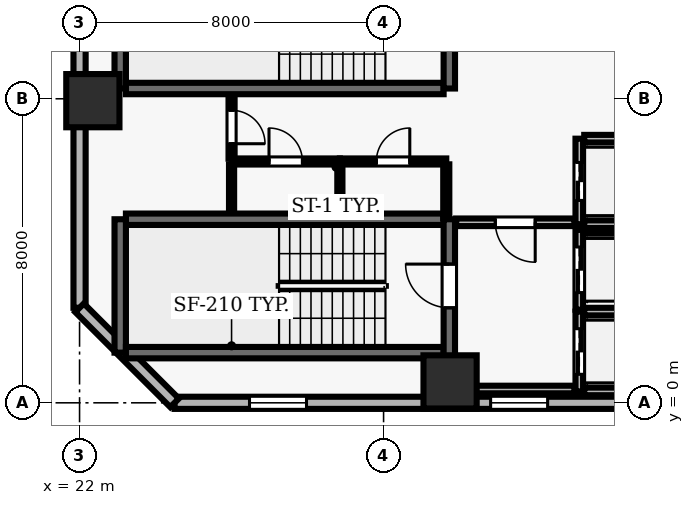
"""IFC4 building model, lengths in metres.
Left out: names, types, materials, properties, quantities, classifications, styles, units other than length and angle.
Written with IfcOpenShell. Run it as: python <this file> out.ifc"""

import sys

from ifc_helpers import new_model, si_unit, direction, frame, frame_2d, origin, origin_2d, place, context, subcontext, project, spatial, rectangle, extrude, element, fill, save


model = new_model("IFC4")
c1 = context("Model", 3, precision=1e-05, world=origin(), true_north=direction((0.0, 1.0)))
c2 = subcontext(c1, "Body", "Model", "MODEL_VIEW")
j1 = project(units=[si_unit("LENGTHUNIT", "METRE"), si_unit("PLANEANGLEUNIT", "RADIAN")], contexts=[c1])
p1 = place(None, origin())
s1 = spatial("IfcSite", under=j1, at=p1, CompositionType="ELEMENT")
p2 = place(p1, origin())
s2 = spatial("IfcBuilding", under=s1, at=p2, CompositionType="ELEMENT")
p3 = place(p2, frame((0.0, 0.0, 58.3)))
s3 = spatial("IfcBuildingStorey", under=s2, at=p3, CompositionType="ELEMENT", Elevation=58.3)
for number, where, z_axis, x_axis in (
    (1, (31.75, 0.55, 0.0), (0.0, 0.0, 1.0), (1.0, 0.0, 0.0)),
    (2, (22.35, 7.95, 0.0), (0.0, 0.0, 1.0), (1.0, 0.0, 0.0)),
):
    element("IfcColumn", number, at=place(p3, frame(where, z_axis=z_axis, x_axis=x_axis)), inside=s3, PredefinedType="COLUMN", context=c2, shape_type="SweptSolid", body=[
        extrude(rectangle(XDim=1.4, YDim=1.4, at=origin_2d()), origin(), (0.0, 0.0, 1.0), 3.9),
    ])
p4 = place(p3, frame((24.5, 0.0, 0.0), z_axis=(0.0, 0.0, 1.0), x_axis=(1.0, 0.0, 0.0)))
e3 = element("IfcWall", 3, at=p4, inside=s3, PredefinedType="SOLIDWALL", context=c2, shape_type="SweptSolid", body=[
    extrude(rectangle(XDim=49.0, YDim=0.32, at=frame_2d((24.5, 0.0))), origin(), (0.0, 0.0, 1.0), 3.69),
])
p5 = place(p4, frame((1.972, 0.0, 0.9)))
e4 = element("IfcOpeningElement", 4, at=p5, cuts=e3, PredefinedType="OPENING", context=c2, shape_type="SweptSolid", body=[
    extrude(rectangle(XDim=1.5, YDim=1.6, at=frame_2d((0.75, 0.8))), frame((0.0, 0.17, 0.0), z_axis=(0.0, -1.0, 0.0), x_axis=(1.0, 0.0, 0.0)), (0.0, 0.0, 1.0), 0.34),
])
p6 = place(p4, frame((8.317, 0.0, 0.9)))
e5 = element("IfcOpeningElement", 5, at=p6, cuts=e3, PredefinedType="OPENING", context=c2, shape_type="SweptSolid", body=[
    extrude(rectangle(XDim=1.5, YDim=1.6, at=frame_2d((0.75, 0.8))), frame((0.0, 0.17, 0.0), z_axis=(0.0, -1.0, 0.0), x_axis=(1.0, 0.0, 0.0)), (0.0, 0.0, 1.0), 0.34),
])
p7 = place(p4, frame((18.306, 0.0, 0.9)))
e6 = element("IfcOpeningElement", 6, at=p7, cuts=e3, PredefinedType="OPENING", context=c2, shape_type="SweptSolid", body=[
    extrude(rectangle(XDim=1.5, YDim=1.6, at=frame_2d((0.75, 0.8))), frame((0.0, 0.17, 0.0), z_axis=(0.0, -1.0, 0.0), x_axis=(1.0, 0.0, 0.0)), (0.0, 0.0, 1.0), 0.34),
])
p8 = place(p4, frame((29.194, 0.0, 0.9)))
e7 = element("IfcOpeningElement", 7, at=p8, cuts=e3, PredefinedType="OPENING", context=c2, shape_type="SweptSolid", body=[
    extrude(rectangle(XDim=1.5, YDim=1.6, at=frame_2d((0.75, 0.8))), frame((0.0, 0.17, 0.0), z_axis=(0.0, -1.0, 0.0), x_axis=(1.0, 0.0, 0.0)), (0.0, 0.0, 1.0), 0.34),
])
p9 = place(p4, frame((35.089, 0.0, 0.9)))
e8 = element("IfcOpeningElement", 8, at=p9, cuts=e3, PredefinedType="OPENING", context=c2, shape_type="SweptSolid", body=[
    extrude(rectangle(XDim=1.5, YDim=1.6, at=frame_2d((0.75, 0.8))), frame((0.0, 0.17, 0.0), z_axis=(0.0, -1.0, 0.0), x_axis=(1.0, 0.0, 0.0)), (0.0, 0.0, 1.0), 0.34),
])
p10 = place(p4, frame((40.083, 0.0, 0.9)))
e9 = element("IfcOpeningElement", 9, at=p10, cuts=e3, PredefinedType="OPENING", context=c2, shape_type="SweptSolid", body=[
    extrude(rectangle(XDim=1.5, YDim=1.6, at=frame_2d((0.75, 0.8))), frame((0.0, 0.17, 0.0), z_axis=(0.0, -1.0, 0.0), x_axis=(1.0, 0.0, 0.0)), (0.0, 0.0, 1.0), 0.34),
])
p11 = place(p4, frame((45.528, 0.0, 0.9)))
e10 = element("IfcOpeningElement", 10, at=p11, cuts=e3, PredefinedType="OPENING", context=c2, shape_type="SweptSolid", body=[
    extrude(rectangle(XDim=1.5, YDim=1.6, at=frame_2d((0.75, 0.8))), frame((0.0, 0.17, 0.0), z_axis=(0.0, -1.0, 0.0), x_axis=(1.0, 0.0, 0.0)), (0.0, 0.0, 1.0), 0.34),
])
p12 = place(p3, frame((22.0, 51.5, 0.0), z_axis=(0.0, 0.0, 1.0), x_axis=(0.0, -1.0, 0.0)))
e11 = element("IfcWall", 11, at=p12, inside=s3, PredefinedType="SOLIDWALL", context=c2, shape_type="SweptSolid", body=[
    extrude(rectangle(XDim=49.0, YDim=0.32, at=frame_2d((24.5, 0.0))), origin(), (0.0, 0.0, 1.0), 3.69),
])
p13 = place(p12, frame((17.8, 0.0, 0.0)))
e12 = element("IfcOpeningElement", 12, at=p13, cuts=e11, PredefinedType="OPENING", context=c2, shape_type="SweptSolid", body=[
    extrude(rectangle(XDim=1.0, YDim=2.2, at=frame_2d((0.5, 1.1))), frame((0.0, 0.17, 0.0), z_axis=(0.0, -1.0, 0.0), x_axis=(1.0, 0.0, 0.0)), (0.0, 0.0, 1.0), 0.34),
])
p14 = place(p12, frame((1.972, 0.0, 0.9)))
e13 = element("IfcOpeningElement", 13, at=p14, cuts=e11, PredefinedType="OPENING", context=c2, shape_type="SweptSolid", body=[
    extrude(rectangle(XDim=1.5, YDim=1.6, at=frame_2d((0.75, 0.8))), frame((0.0, 0.17, 0.0), z_axis=(0.0, -1.0, 0.0), x_axis=(1.0, 0.0, 0.0)), (0.0, 0.0, 1.0), 0.34),
])
p15 = place(p12, frame((7.417, 0.0, 0.9)))
e14 = element("IfcOpeningElement", 14, at=p15, cuts=e11, PredefinedType="OPENING", context=c2, shape_type="SweptSolid", body=[
    extrude(rectangle(XDim=1.5, YDim=1.6, at=frame_2d((0.75, 0.8))), frame((0.0, 0.17, 0.0), z_axis=(0.0, -1.0, 0.0), x_axis=(1.0, 0.0, 0.0)), (0.0, 0.0, 1.0), 0.34),
])
p16 = place(p12, frame((12.861, 0.0, 0.9)))
e15 = element("IfcOpeningElement", 15, at=p16, cuts=e11, PredefinedType="OPENING", context=c2, shape_type="SweptSolid", body=[
    extrude(rectangle(XDim=1.5, YDim=1.6, at=frame_2d((0.75, 0.8))), frame((0.0, 0.17, 0.0), z_axis=(0.0, -1.0, 0.0), x_axis=(1.0, 0.0, 0.0)), (0.0, 0.0, 1.0), 0.34),
])
p17 = place(p12, frame((19.206, 0.0, 0.9)))
e16 = element("IfcOpeningElement", 16, at=p17, cuts=e11, PredefinedType="OPENING", context=c2, shape_type="SweptSolid", body=[
    extrude(rectangle(XDim=1.5, YDim=1.6, at=frame_2d((0.75, 0.8))), frame((0.0, 0.17, 0.0), z_axis=(0.0, -1.0, 0.0), x_axis=(1.0, 0.0, 0.0)), (0.0, 0.0, 1.0), 0.34),
])
p18 = place(p12, frame((23.3, 0.0, 0.9)))
e17 = element("IfcOpeningElement", 17, at=p18, cuts=e11, PredefinedType="OPENING", context=c2, shape_type="SweptSolid", body=[
    extrude(rectangle(XDim=1.5, YDim=1.6, at=frame_2d((0.75, 0.8))), frame((0.0, 0.17, 0.0), z_axis=(0.0, -1.0, 0.0), x_axis=(1.0, 0.0, 0.0)), (0.0, 0.0, 1.0), 0.34),
])
p19 = place(p12, frame((29.194, 0.0, 0.9)))
e18 = element("IfcOpeningElement", 18, at=p19, cuts=e11, PredefinedType="OPENING", context=c2, shape_type="SweptSolid", body=[
    extrude(rectangle(XDim=1.5, YDim=1.6, at=frame_2d((0.75, 0.8))), frame((0.0, 0.17, 0.0), z_axis=(0.0, -1.0, 0.0), x_axis=(1.0, 0.0, 0.0)), (0.0, 0.0, 1.0), 0.34),
])
p20 = place(p12, frame((34.189, 0.0, 0.9)))
e19 = element("IfcOpeningElement", 19, at=p20, cuts=e11, PredefinedType="OPENING", context=c2, shape_type="SweptSolid", body=[
    extrude(rectangle(XDim=1.5, YDim=1.6, at=frame_2d((0.75, 0.8))), frame((0.0, 0.17, 0.0), z_axis=(0.0, -1.0, 0.0), x_axis=(1.0, 0.0, 0.0)), (0.0, 0.0, 1.0), 0.34),
])
p21 = place(p12, frame((40.083, 0.0, 0.9)))
e20 = element("IfcOpeningElement", 20, at=p21, cuts=e11, PredefinedType="OPENING", context=c2, shape_type="SweptSolid", body=[
    extrude(rectangle(XDim=1.5, YDim=1.6, at=frame_2d((0.75, 0.8))), frame((0.0, 0.17, 0.0), z_axis=(0.0, -1.0, 0.0), x_axis=(1.0, 0.0, 0.0)), (0.0, 0.0, 1.0), 0.34),
])
p22 = place(p3, frame((22.0, 2.5, 0.0), z_axis=(0.0, 0.0, 1.0), x_axis=(0.707106781187, -0.707106781187, 0.0)))
e21 = element("IfcWall", 21, at=p22, inside=s3, PredefinedType="SOLIDWALL", context=c2, shape_type="SweptSolid", body=[
    extrude(rectangle(XDim=3.536, YDim=0.32, at=frame_2d((1.768, 0.0))), origin(), (0.0, 0.0, 1.0), 3.69),
])
p23 = place(p3, frame((31.58, 4.83, 0.0), z_axis=(0.0, 0.0, 1.0), x_axis=(-1.0, 0.0, 0.0)))
e22 = element("IfcWall", 22, at=p23, inside=s3, PredefinedType="SHEAR", context=c2, shape_type="SweptSolid", body=[
    extrude(rectangle(XDim=8.36, YDim=0.3, at=frame_2d((4.18, 0.0))), origin(), (0.0, 0.0, 1.0), 3.69),
])
p24 = place(p3, frame((23.07, 4.83, 0.0), z_axis=(0.0, 0.0, 1.0), x_axis=(0.0, -1.0, 0.0)))
e23 = element("IfcWall", 23, at=p24, inside=s3, PredefinedType="SHEAR", context=c2, shape_type="SweptSolid", body=[
    extrude(rectangle(XDim=3.51, YDim=0.3, at=frame_2d((1.755, 0.0))), origin(), (0.0, 0.0, 1.0), 3.69),
])
p25 = place(p3, frame((23.22, 1.32, 0.0), z_axis=(0.0, 0.0, 1.0), x_axis=(1.0, 0.0, 0.0)))
e24 = element("IfcWall", 24, at=p25, inside=s3, PredefinedType="SHEAR", context=c2, shape_type="SweptSolid", body=[
    extrude(rectangle(XDim=8.36, YDim=0.3, at=frame_2d((4.18, 0.0))), origin(), (0.0, 0.0, 1.0), 3.69),
])
p26 = place(p3, frame((31.73, 0.96, 0.0), z_axis=(0.0, 0.0, 1.0), x_axis=(0.0, 1.0, 0.0)))
e25 = element("IfcWall", 25, at=p26, inside=s3, PredefinedType="SHEAR", context=c2, shape_type="SweptSolid", body=[
    extrude(rectangle(XDim=3.87, YDim=0.3, at=frame_2d((1.935, 0.0))), origin(), (0.0, 0.0, 1.0), 3.69),
])
p27 = place(p26, frame((1.54, 0.0, 0.0)))
e26 = element("IfcOpeningElement", 26, at=p27, cuts=e25, PredefinedType="OPENING", context=c2, shape_type="SweptSolid", body=[
    extrude(rectangle(XDim=1.15, YDim=2.15, at=frame_2d((0.575, 1.075))), frame((0.0, 0.16, 0.0), z_axis=(0.0, -1.0, 0.0), x_axis=(1.0, 0.0, 0.0)), (0.0, 0.0, 1.0), 0.32),
])
p28 = place(p3, frame((23.07, 11.78, 0.0), z_axis=(0.0, 0.0, 1.0), x_axis=(0.0, -1.0, 0.0)))
e27 = element("IfcWall", 27, at=p28, inside=s3, PredefinedType="SHEAR", context=c2, shape_type="SweptSolid", body=[
    extrude(rectangle(XDim=3.51, YDim=0.3, at=frame_2d((1.755, 0.0))), origin(), (0.0, 0.0, 1.0), 3.69),
])
p29 = place(p3, frame((23.22, 8.27, 0.0), z_axis=(0.0, 0.0, 1.0), x_axis=(1.0, 0.0, 0.0)))
e28 = element("IfcWall", 28, at=p29, inside=s3, PredefinedType="SHEAR", context=c2, shape_type="SweptSolid", body=[
    extrude(rectangle(XDim=8.36, YDim=0.3, at=frame_2d((4.18, 0.0))), origin(), (0.0, 0.0, 1.0), 3.69),
])
p30 = place(p3, frame((31.73, 8.27, 0.0), z_axis=(0.0, 0.0, 1.0), x_axis=(0.0, 1.0, 0.0)))
e29 = element("IfcWall", 29, at=p30, inside=s3, PredefinedType="SHEAR", context=c2, shape_type="SweptSolid", body=[
    extrude(rectangle(XDim=3.51, YDim=0.3, at=frame_2d((1.755, 0.0))), origin(), (0.0, 0.0, 1.0), 3.69),
])
p31 = place(p30, frame((1.18, 0.0, 0.0)))
e30 = element("IfcOpeningElement", 30, at=p31, cuts=e29, PredefinedType="OPENING", context=c2, shape_type="SweptSolid", body=[
    extrude(rectangle(XDim=1.15, YDim=2.15, at=frame_2d((0.575, 1.075))), frame((0.0, 0.16, 0.0), z_axis=(0.0, -1.0, 0.0), x_axis=(1.0, 0.0, 0.0)), (0.0, 0.0, 1.0), 0.32),
])
p32 = place(p3, frame((35.15, 2.4, 0.0), z_axis=(0.0, 0.0, 1.0), x_axis=(0.0, -1.0, 0.0)))
e31 = element("IfcWall", 31, at=p32, inside=s3, PredefinedType="SOLIDWALL", context=c2, shape_type="SweptSolid", body=[
    extrude(rectangle(XDim=2.1, YDim=0.2, at=frame_2d((1.05, 0.0))), origin(), (0.0, 0.0, 1.0), 3.69),
])
p33 = place(p32, frame((0.45, 0.0, 0.0)))
e32 = element("IfcOpeningElement", 32, at=p33, cuts=e31, PredefinedType="OPENING", context=c2, shape_type="SweptSolid", body=[
    extrude(rectangle(XDim=1.2, YDim=2.15, at=frame_2d((0.6, 1.075))), frame((0.0, 0.11, 0.0), z_axis=(0.0, -1.0, 0.0), x_axis=(1.0, 0.0, 0.0)), (0.0, 0.0, 1.0), 0.22),
])
for number, where, z_axis, x_axis in (
    (33, (35.28, 0.3, 0.0), (0.0, 0.0, 1.0), (1.0, 0.0, 0.0)),
    (34, (37.42, 2.4, 0.0), (0.0, 0.0, 1.0), (-1.0, 0.0, 0.0)),
):
    element("IfcWall", number, at=place(p3, frame(where, z_axis=z_axis, x_axis=x_axis)), inside=s3, PredefinedType="SOLIDWALL", context=c2, shape_type="SweptSolid", body=[
        extrude(rectangle(XDim=2.14, YDim=0.2, at=frame_2d((1.07, 0.0))), origin(), (0.0, 0.0, 1.0), 3.69),
    ])
p34 = place(p3, frame((35.15, 4.55, 0.0), z_axis=(0.0, 0.0, 1.0), x_axis=(0.0, -1.0, 0.0)))
e35 = element("IfcWall", 35, at=p34, inside=s3, PredefinedType="SOLIDWALL", context=c2, shape_type="SweptSolid", body=[
    extrude(rectangle(XDim=2.1, YDim=0.2, at=frame_2d((1.05, 0.0))), origin(), (0.0, 0.0, 1.0), 3.69),
])
p35 = place(p34, frame((0.45, 0.0, 0.0)))
e36 = element("IfcOpeningElement", 36, at=p35, cuts=e35, PredefinedType="OPENING", context=c2, shape_type="SweptSolid", body=[
    extrude(rectangle(XDim=1.2, YDim=2.15, at=frame_2d((0.6, 1.075))), frame((0.0, 0.11, 0.0), z_axis=(0.0, -1.0, 0.0), x_axis=(1.0, 0.0, 0.0)), (0.0, 0.0, 1.0), 0.22),
])
p36 = place(p3, frame((37.42, 4.55, 0.0), z_axis=(0.0, 0.0, 1.0), x_axis=(-1.0, 0.0, 0.0)))
e37 = element("IfcWall", 37, at=p36, inside=s3, PredefinedType="SOLIDWALL", context=c2, shape_type="SweptSolid", body=[
    extrude(rectangle(XDim=2.14, YDim=0.2, at=frame_2d((1.07, 0.0))), origin(), (0.0, 0.0, 1.0), 3.69),
])
p37 = place(p3, frame((35.15, 6.95, 0.0), z_axis=(0.0, 0.0, 1.0), x_axis=(0.0, -1.0, 0.0)))
e38 = element("IfcWall", 38, at=p37, inside=s3, PredefinedType="SOLIDWALL", context=c2, shape_type="SweptSolid", body=[
    extrude(rectangle(XDim=2.25, YDim=0.2, at=frame_2d((1.125, 0.0))), origin(), (0.0, 0.0, 1.0), 3.69),
])
p38 = place(p37, frame((0.625, 0.0, 0.0)))
e39 = element("IfcOpeningElement", 39, at=p38, cuts=e38, PredefinedType="OPENING", context=c2, shape_type="SweptSolid", body=[
    extrude(rectangle(XDim=1.0, YDim=2.1, at=frame_2d((0.5, 1.05))), frame((0.0, 0.11, 0.0), z_axis=(0.0, -1.0, 0.0), x_axis=(1.0, 0.0, 0.0)), (0.0, 0.0, 1.0), 0.22),
])
for number, where, z_axis, x_axis in (
    (40, (35.28, 4.7, 0.0), (0.0, 0.0, 1.0), (1.0, 0.0, 0.0)),
    (41, (37.42, 6.95, 0.0), (0.0, 0.0, 1.0), (-1.0, 0.0, 0.0)),
):
    element("IfcWall", number, at=place(p3, frame(where, z_axis=z_axis, x_axis=x_axis)), inside=s3, PredefinedType="SOLIDWALL", context=c2, shape_type="SweptSolid", body=[
        extrude(rectangle(XDim=2.14, YDim=0.2, at=frame_2d((1.07, 0.0))), origin(), (0.0, 0.0, 1.0), 3.69),
    ])
p39 = place(p3, frame((26.0, 6.35, 0.0), z_axis=(0.0, 0.0, 1.0), x_axis=(1.0, 0.0, 0.0)))
e42 = element("IfcWall", 42, at=p39, inside=s3, PredefinedType="PARTITIONING", context=c2, shape_type="SweptSolid", body=[
    extrude(rectangle(XDim=2.85, YDim=0.16, at=frame_2d((1.425, 0.0))), origin(), (0.0, 0.0, 1.0), 3.69),
])
p40 = place(p39, frame((0.985, 0.0, 0.0)))
e43 = element("IfcOpeningElement", 43, at=p40, cuts=e42, PredefinedType="OPENING", context=c2, shape_type="SweptSolid", body=[
    extrude(rectangle(XDim=0.88, YDim=2.1, at=frame_2d((0.44, 1.05))), frame((0.0, 0.09, 0.0), z_axis=(0.0, -1.0, 0.0), x_axis=(1.0, 0.0, 0.0)), (0.0, 0.0, 1.0), 0.18),
])
p41 = place(p3, frame((28.85, 6.35, 0.0), z_axis=(0.0, 0.0, 1.0), x_axis=(1.0, 0.0, 0.0)))
e44 = element("IfcWall", 44, at=p41, inside=s3, PredefinedType="PARTITIONING", context=c2, shape_type="SweptSolid", body=[
    extrude(rectangle(XDim=2.8, YDim=0.16, at=frame_2d((1.4, 0.0))), origin(), (0.0, 0.0, 1.0), 3.69),
])
p42 = place(p41, frame((0.96, 0.0, 0.0)))
e45 = element("IfcOpeningElement", 45, at=p42, cuts=e44, PredefinedType="OPENING", context=c2, shape_type="SweptSolid", body=[
    extrude(rectangle(XDim=0.88, YDim=2.1, at=frame_2d((0.44, 1.05))), frame((0.0, 0.09, 0.0), z_axis=(0.0, -1.0, 0.0), x_axis=(1.0, 0.0, 0.0)), (0.0, 0.0, 1.0), 0.18),
])
p43 = place(p3, frame((31.65, 0.35, 0.0), z_axis=(0.0, 0.0, 1.0), x_axis=(1.0, 0.0, 0.0)))
e46 = element("IfcWall", 46, at=p43, inside=s3, PredefinedType="SOLIDWALL", context=c2, shape_type="SweptSolid", body=[
    extrude(rectangle(XDim=3.37, YDim=0.2, at=frame_2d((1.685, 0.0))), origin(), (0.0, 0.0, 1.0), 3.69),
])
p44 = place(p3, frame((35.02, 4.75, 0.0), z_axis=(0.0, 0.0, 1.0), x_axis=(-1.0, 0.0, 0.0)))
e47 = element("IfcWall", 47, at=p44, inside=s3, PredefinedType="SOLIDWALL", context=c2, shape_type="SweptSolid", body=[
    extrude(rectangle(XDim=3.11, YDim=0.2, at=frame_2d((1.555, 0.0))), origin(), (0.0, 0.0, 1.0), 3.69),
])
p45 = place(p44, frame((1.03, 0.0, 0.0)))
e48 = element("IfcOpeningElement", 48, at=p45, cuts=e47, PredefinedType="OPENING", context=c2, shape_type="SweptSolid", body=[
    extrude(rectangle(XDim=1.05, YDim=2.15, at=frame_2d((0.525, 1.075))), frame((0.0, 0.11, 0.0), z_axis=(0.0, -1.0, 0.0), x_axis=(1.0, 0.0, 0.0)), (0.0, 0.0, 1.0), 0.22),
])
p46 = place(p3, frame((26.0, 5.01, 0.0), z_axis=(0.0, 0.0, 1.0), x_axis=(0.0, 1.0, 0.0)))
e49 = element("IfcWall", 49, at=p46, inside=s3, PredefinedType="PARTITIONING", context=c2, shape_type="SweptSolid", body=[
    extrude(rectangle(XDim=1.265, YDim=0.135, at=frame_2d((0.632, 0.0))), origin(), (0.0, 0.0, 1.0), 3.69),
])
p47 = place(p3, frame((26.0, 8.09, 0.0), z_axis=(0.0, 0.0, 1.0), x_axis=(0.0, -1.0, 0.0)))
e50 = element("IfcWall", 50, at=p47, inside=s3, PredefinedType="PARTITIONING", context=c2, shape_type="SweptSolid", body=[
    extrude(rectangle(XDim=1.665, YDim=0.16, at=frame_2d((0.833, 0.0))), origin(), (0.0, 0.0, 1.0), 3.69),
])
p48 = place(p47, frame((0.393, 0.0, 0.0)))
e51 = element("IfcOpeningElement", 51, at=p48, cuts=e50, PredefinedType="OPENING", context=c2, shape_type="SweptSolid", body=[
    extrude(rectangle(XDim=0.88, YDim=2.1, at=frame_2d((0.44, 1.05))), frame((0.0, 0.09, 0.0), z_axis=(0.0, -1.0, 0.0), x_axis=(1.0, 0.0, 0.0)), (0.0, 0.0, 1.0), 0.18),
])
p49 = place(p3, frame((28.85, 5.01, 0.0), z_axis=(0.0, 0.0, 1.0), x_axis=(0.0, 1.0, 0.0)))
e52 = element("IfcWall", 52, at=p49, inside=s3, PredefinedType="PARTITIONING", context=c2, shape_type="SweptSolid", body=[
    extrude(rectangle(XDim=1.265, YDim=0.135, at=frame_2d((0.632, 0.0))), origin(), (0.0, 0.0, 1.0), 3.69),
])
p50 = place(p3, frame((31.65, 4.86, 0.0), z_axis=(0.0, 0.0, 1.0), x_axis=(0.0, 1.0, 0.0)))
e53 = element("IfcWall", 53, at=p50, inside=s3, PredefinedType="PARTITIONING", context=c2, shape_type="SweptSolid", body=[
    extrude(rectangle(XDim=1.415, YDim=0.16, at=frame_2d((0.708, 0.0))), origin(), (0.0, 0.0, 1.0), 3.69),
])
p51 = place(p5, origin())
e54 = element("IfcWindow", 54, at=p51, inside=s3, PartitioningType="SINGLE_PANEL", PredefinedType="WINDOW", context=c2, shape_type="SweptSolid", body=[
    extrude(rectangle(XDim=1.5, YDim=1.6, at=frame_2d((0.75, 0.8))), frame((0.0, 0.03, 0.0), z_axis=(0.0, -1.0, 0.0), x_axis=(1.0, 0.0, 0.0)), (0.0, 0.0, 1.0), 0.06),
])
fill(e4, e54)
p52 = place(p6, origin())
e55 = element("IfcWindow", 55, at=p52, inside=s3, PartitioningType="SINGLE_PANEL", PredefinedType="WINDOW", context=c2, shape_type="SweptSolid", body=[
    extrude(rectangle(XDim=1.5, YDim=1.6, at=frame_2d((0.75, 0.8))), frame((0.0, 0.03, 0.0), z_axis=(0.0, -1.0, 0.0), x_axis=(1.0, 0.0, 0.0)), (0.0, 0.0, 1.0), 0.06),
])
fill(e5, e55)
p53 = place(p27, origin())
e56 = element("IfcDoor", 56, at=p53, inside=s3, OperationType="SINGLE_SWING_RIGHT", PredefinedType="DOOR", context=c2, shape_type="SweptSolid", body=[
    extrude(rectangle(XDim=1.15, YDim=2.15, at=frame_2d((0.575, 1.075))), frame((0.0, 0.025, 0.0), z_axis=(0.0, -1.0, 0.0), x_axis=(1.0, 0.0, 0.0)), (0.0, 0.0, 1.0), 0.05),
])
fill(e26, e56)
p54 = place(p33, origin())
e57 = element("IfcDoor", 57, at=p54, inside=s3, OperationType="DOUBLE_DOOR_SLIDING", PredefinedType="DOOR", context=c2, shape_type="SweptSolid", body=[
    extrude(rectangle(XDim=1.2, YDim=2.15, at=frame_2d((0.6, 1.075))), frame((0.0, 0.025, 0.0), z_axis=(0.0, -1.0, 0.0), x_axis=(1.0, 0.0, 0.0)), (0.0, 0.0, 1.0), 0.05),
])
fill(e32, e57)
p55 = place(p35, origin())
e58 = element("IfcDoor", 58, at=p55, inside=s3, OperationType="DOUBLE_DOOR_SLIDING", PredefinedType="DOOR", context=c2, shape_type="SweptSolid", body=[
    extrude(rectangle(XDim=1.2, YDim=2.15, at=frame_2d((0.6, 1.075))), frame((0.0, 0.025, 0.0), z_axis=(0.0, -1.0, 0.0), x_axis=(1.0, 0.0, 0.0)), (0.0, 0.0, 1.0), 0.05),
])
fill(e36, e58)
p56 = place(p38, origin())
e59 = element("IfcDoor", 59, at=p56, inside=s3, OperationType="DOUBLE_DOOR_SLIDING", PredefinedType="DOOR", context=c2, shape_type="SweptSolid", body=[
    extrude(rectangle(XDim=1.0, YDim=2.1, at=frame_2d((0.5, 1.05))), frame((0.0, 0.025, 0.0), z_axis=(0.0, -1.0, 0.0), x_axis=(1.0, 0.0, 0.0)), (0.0, 0.0, 1.0), 0.05),
])
fill(e39, e59)
p57 = place(p45, origin())
e60 = element("IfcDoor", 60, at=p57, inside=s3, OperationType="SINGLE_SWING_LEFT", PredefinedType="DOOR", context=c2, shape_type="SweptSolid", body=[
    extrude(rectangle(XDim=1.05, YDim=2.15, at=frame_2d((0.525, 1.075))), frame((0.0, 0.025, 0.0), z_axis=(0.0, -1.0, 0.0), x_axis=(1.0, 0.0, 0.0)), (0.0, 0.0, 1.0), 0.05),
])
fill(e48, e60)
p58 = place(p48, origin())
e61 = element("IfcDoor", 61, at=p58, inside=s3, OperationType="SINGLE_SWING_RIGHT", PredefinedType="DOOR", context=c2, shape_type="SweptSolid", body=[
    extrude(rectangle(XDim=0.88, YDim=2.1, at=frame_2d((0.44, 1.05))), frame((0.0, 0.025, 0.0), z_axis=(0.0, -1.0, 0.0), x_axis=(1.0, 0.0, 0.0)), (0.0, 0.0, 1.0), 0.05),
])
fill(e51, e61)
p59 = place(p40, origin())
e62 = element("IfcDoor", 62, at=p59, inside=s3, OperationType="SINGLE_SWING_LEFT", PredefinedType="DOOR", context=c2, shape_type="SweptSolid", body=[
    extrude(rectangle(XDim=0.88, YDim=2.1, at=frame_2d((0.44, 1.05))), frame((0.0, 0.025, 0.0), z_axis=(0.0, -1.0, 0.0), x_axis=(1.0, 0.0, 0.0)), (0.0, 0.0, 1.0), 0.05),
])
fill(e43, e62)
p60 = place(p42, origin())
e63 = element("IfcDoor", 63, at=p60, inside=s3, OperationType="SINGLE_SWING_RIGHT", PredefinedType="DOOR", context=c2, shape_type="SweptSolid", body=[
    extrude(rectangle(XDim=0.88, YDim=2.1, at=frame_2d((0.44, 1.05))), frame((0.0, 0.025, 0.0), z_axis=(0.0, -1.0, 0.0), x_axis=(1.0, 0.0, 0.0)), (0.0, 0.0, 1.0), 0.05),
])
fill(e45, e63)
save(model, sys.argv[1])
